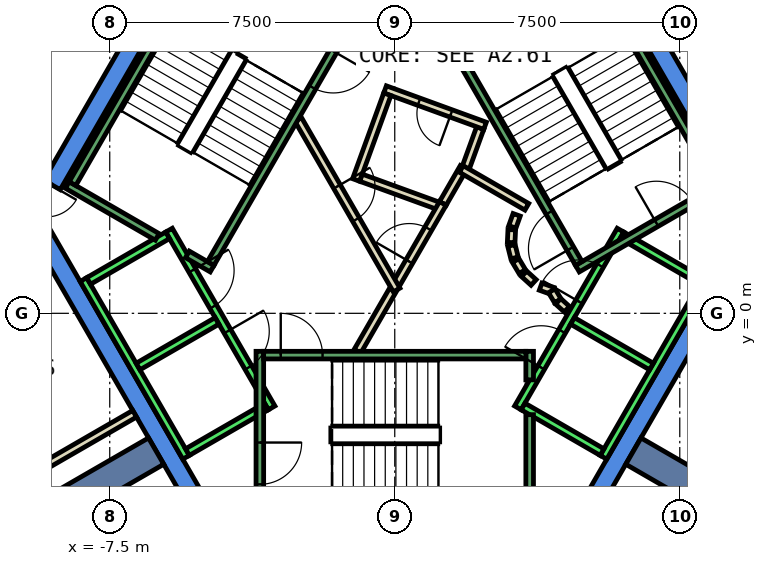
"""IFC4 building model, lengths in metres.
Left out: names, types, materials, properties, quantities, classifications, styles, units other than length and angle.
Written with IfcOpenShell. Run it as: python <this file> out.ifc"""

import sys

from ifc_helpers import new_model, si_unit, direction, frame, frame_2d, origin, place, context, subcontext, project, spatial, polyline, rectangle, outline, extrude, element, fill, save


model = new_model("IFC4")
c1 = context("Model", 3, precision=1e-05, world=origin(), true_north=direction((0.0, 1.0)))
c2 = subcontext(c1, "Body", "Model", "MODEL_VIEW")
j1 = project(units=[si_unit("LENGTHUNIT", "METRE"), si_unit("PLANEANGLEUNIT", "RADIAN")], contexts=[c1])
p1 = place(None, origin())
s1 = spatial("IfcSite", under=j1, at=p1, CompositionType="ELEMENT")
p2 = place(p1, origin())
s2 = spatial("IfcBuilding", under=s1, at=p2, CompositionType="ELEMENT")
p3 = place(p2, frame((0.0, 0.0, 286.4)))
s3 = spatial("IfcBuildingStorey", under=s2, at=p3, CompositionType="ELEMENT", Elevation=286.4)
p4 = place(p3, frame((0.0, 0.0, -0.6)))
e1 = element("IfcWall", 1, at=p4, inside=s3, PredefinedType="SHEAR", context=c2, shape_type="SweptSolid", body=[
    extrude(outline(polyline([(5.486, 9.998), (5.053, 9.748), (9.238, 2.5), (9.815, 2.5), (5.486, 9.998)])), origin(), (0.0, 0.0, 1.0), 3.86),
])
p5 = place(p3, frame((0.0, 0.0, -0.6)))
e2 = element("IfcWall", 2, at=p5, inside=s3, PredefinedType="SHEAR", context=c2, shape_type="SweptSolid", body=[
    extrude(outline(polyline([(-9.236, 3.502), (-8.803, 3.253), (-4.619, 10.5), (-4.907, 11.0), (-9.236, 3.502)])), origin(), (0.0, 0.0, 1.0), 3.86),
])
p6 = place(p3, frame((0.0, 0.0, -0.6)))
e3 = element("IfcWall", 3, at=p6, inside=s3, PredefinedType="SHEAR", context=c2, shape_type="SweptSolid", body=[
    extrude(outline(polyline([(-9.815, 2.5), (-4.907, -6.0), (-4.619, -5.5), (-9.238, 2.5), (-9.815, 2.5)])), origin(), (0.0, 0.0, 1.0), 3.86),
])
p7 = place(p3, frame((0.0, 0.0, -0.6)))
e4 = element("IfcWall", 4, at=p7, inside=s3, PredefinedType="SHEAR", context=c2, shape_type="SweptSolid", body=[
    extrude(outline(polyline([(4.907, -6.0), (9.815, 2.5), (9.238, 2.5), (4.619, -5.5), (4.907, -6.0)])), origin(), (0.0, 0.0, 1.0), 3.86),
])
for number, where, z_axis, x_axis in (
    (5, (6.279, -3.625, -0.6), (0.0, 0.0, 1.0), (0.866, -0.5, 0.0)),
    (6, (-6.279, -3.625, -0.6), (0.0, 0.0, 1.0), (-0.866, -0.5, 0.0)),
):
    element("IfcWall", number, at=place(p3, frame(where, z_axis=z_axis, x_axis=x_axis)), inside=s3, PredefinedType="SHEAR", context=c2, shape_type="SweptSolid", body=[
        extrude(rectangle(XDim=9.0, YDim=0.8, at=frame_2d((4.5, 0.0))), origin(), (0.0, 0.0, 1.0), 3.86),
    ])
p8 = place(p3, frame((1.264, 2.89, 0.0), z_axis=(0.0, 0.0, 1.0), x_axis=(0.500043792738, 0.866000118559, 0.0)))
e7 = element("IfcWall", 7, at=p8, inside=s3, PredefinedType="PARTITIONING", context=c2, shape_type="SweptSolid", body=[
    extrude(rectangle(XDim=1.096, YDim=0.2, at=frame_2d((0.548, 0.0))), origin(), (0.0, 0.0, 1.0), 3.26),
])
p9 = place(p3, frame((1.838, 3.748, 0.0), z_axis=(0.0, 0.0, 1.0), x_axis=(0.342266462435, 0.939602931398, 0.0)))
e8 = element("IfcWall", 8, at=p9, inside=s3, PredefinedType="PARTITIONING", context=c2, shape_type="SweptSolid", body=[
    extrude(rectangle(XDim=1.198, YDim=0.2, at=frame_2d((0.599, 0.0))), origin(), (0.0, 0.0, 1.0), 3.26),
])
p10 = place(p3, frame((2.376, 4.934, 0.0), z_axis=(0.0, 0.0, 1.0), x_axis=(-0.939640574808, 0.342163104635, 0.0)))
e9 = element("IfcWall", 9, at=p10, inside=s3, PredefinedType="PARTITIONING", context=c2, shape_type="SweptSolid", body=[
    extrude(rectangle(XDim=2.8, YDim=0.2, at=frame_2d((1.4, 0.0))), origin(), (0.0, 0.0, 1.0), 3.26),
])
p11 = place(p10, frame((0.95, 0.0, 0.0)))
e10 = element("IfcOpeningElement", 10, at=p11, cuts=e9, PredefinedType="OPENING", context=c2, shape_type="SweptSolid", body=[
    extrude(rectangle(XDim=0.9, YDim=2.1, at=frame_2d((0.45, 1.05))), frame((0.0, 0.11, 0.0), z_axis=(0.0, -1.0, 0.0), x_axis=(1.0, 0.0, 0.0)), (0.0, 0.0, 1.0), 0.22),
])
p12 = place(p3, frame((-0.196, 5.764, 0.0), z_axis=(0.0, 0.0, 1.0), x_axis=(-0.34165322761, -0.939826086073, 0.0)))
e11 = element("IfcWall", 11, at=p12, inside=s3, PredefinedType="PARTITIONING", context=c2, shape_type="SweptSolid", body=[
    extrude(rectangle(XDim=2.4, YDim=0.2, at=frame_2d((1.2, 0.0))), origin(), (0.0, 0.0, 1.0), 3.26),
])
p13 = place(p3, frame((-0.888, 3.568, 0.0), z_axis=(0.0, 0.0, 1.0), x_axis=(0.939685034098, -0.34204098686, 0.0)))
e12 = element("IfcWall", 12, at=p13, inside=s3, PredefinedType="PARTITIONING", context=c2, shape_type="SweptSolid", body=[
    extrude(rectangle(XDim=2.237, YDim=0.2, at=frame_2d((1.119, 0.0))), origin(), (0.0, 0.0, 1.0), 3.26),
])
p14 = place(p3, frame((-0.982, -1.0, 0.0), z_axis=(0.0, 0.0, 1.0), x_axis=(0.50024047865, 0.865886518847, 0.0)))
e13 = element("IfcWall", 13, at=p14, inside=s3, PredefinedType="PARTITIONING", context=c2, shape_type="SweptSolid", body=[
    extrude(rectangle(XDim=1.863, YDim=0.2, at=frame_2d((0.931, 0.0))), origin(), (0.0, 0.0, 1.0), 3.26),
])
p15 = place(p3, frame((0.05, 0.787, 0.0), z_axis=(0.0, 0.0, 1.0), x_axis=(0.499945861543, 0.866056658381, 0.0)))
e14 = element("IfcWall", 14, at=p15, inside=s3, PredefinedType="PARTITIONING", context=c2, shape_type="SweptSolid", body=[
    extrude(rectangle(XDim=2.428, YDim=0.2, at=frame_2d((1.214, 0.0))), origin(), (0.0, 0.0, 1.0), 3.26),
])
p16 = place(p15, frame((0.664, 0.0, 0.0)))
e15 = element("IfcOpeningElement", 15, at=p16, cuts=e14, PredefinedType="OPENING", context=c2, shape_type="SweptSolid", body=[
    extrude(rectangle(XDim=1.0, YDim=2.1, at=frame_2d((0.5, 1.05))), frame((0.0, 0.11, 0.0), z_axis=(0.0, -1.0, 0.0), x_axis=(1.0, 0.0, 0.0)), (0.0, 0.0, 1.0), 0.22),
])
p17 = place(p3, frame((1.751, 3.798, 0.0), z_axis=(0.0, 0.0, 1.0), x_axis=(0.866091650241, -0.499885240213, 0.0)))
e16 = element("IfcWall", 16, at=p17, inside=s3, PredefinedType="PARTITIONING", context=c2, shape_type="SweptSolid", body=[
    extrude(rectangle(XDim=1.991, YDim=0.2, at=frame_2d((0.995, 0.0))), origin(), (0.0, 0.0, 1.0), 3.26),
])
p18 = place(p3, frame((3.208, 2.592, 0.0), z_axis=(0.0, 0.0, 1.0), x_axis=(-0.337388820924, -0.941365382578, 0.0)))
e17 = element("IfcWall", 17, at=p18, inside=s3, PredefinedType="PARTITIONING", context=c2, shape_type="SweptSolid", body=[
    extrude(rectangle(XDim=0.338, YDim=0.2, at=frame_2d((0.169, 0.0))), origin(), (0.0, 0.0, 1.0), 3.26),
])
p19 = place(p3, frame((3.079, 2.199, 0.0), z_axis=(0.0, 0.0, 1.0), x_axis=(-0.047771483479, -0.998858290933, 0.0)))
e18 = element("IfcWall", 18, at=p19, inside=s3, PredefinedType="PARTITIONING", context=c2, shape_type="SweptSolid", body=[
    extrude(rectangle(XDim=0.337, YDim=0.2, at=frame_2d((0.169, 0.0))), origin(), (0.0, 0.0, 1.0), 3.26),
])
p20 = place(p3, frame((3.07, 1.786, 0.0), z_axis=(0.0, 0.0, 1.0), x_axis=(0.242705583207, -0.970099994784, 0.0)))
e19 = element("IfcWall", 19, at=p20, inside=s3, PredefinedType="PARTITIONING", context=c2, shape_type="SweptSolid", body=[
    extrude(rectangle(XDim=0.338, YDim=0.2, at=frame_2d((0.169, 0.0))), origin(), (0.0, 0.0, 1.0), 3.26),
])
for number, where, z_axis, x_axis in (
    (20, (3.182, 1.388, 0.0), (0.0, 0.0, 1.0), (0.512, -0.859, 0.0)),
    (21, (3.404, 1.039, 0.0), (0.0, 0.0, 1.0), (0.74, -0.672, 0.0)),
):
    element("IfcWall", number, at=place(p3, frame(where, z_axis=z_axis, x_axis=x_axis)), inside=s3, PredefinedType="PARTITIONING", context=c2, shape_type="SweptSolid", body=[
        extrude(rectangle(XDim=0.338, YDim=0.2, at=frame_2d((0.169, 0.0))), origin(), (0.0, 0.0, 1.0), 3.26),
    ])
p21 = place(p3, frame((3.838, 0.702, 0.0), z_axis=(0.0, 0.0, 1.0), x_axis=(0.941035081519, -0.338308993895, 0.0)))
e22 = element("IfcWall", 22, at=p21, inside=s3, PredefinedType="PARTITIONING", context=c2, shape_type="SweptSolid", body=[
    extrude(rectangle(XDim=0.337, YDim=0.2, at=frame_2d((0.168, 0.0))), origin(), (0.0, 0.0, 1.0), 3.26),
])
p22 = place(p3, frame((4.132, 0.593, 0.0), z_axis=(0.0, 0.0, 1.0), x_axis=(0.513561617048, -0.858052717201, 0.0)))
e23 = element("IfcWall", 23, at=p22, inside=s3, PredefinedType="PARTITIONING", context=c2, shape_type="SweptSolid", body=[
    extrude(rectangle(XDim=0.308, YDim=0.2, at=frame_2d((0.154, 0.0))), origin(), (0.0, 0.0, 1.0), 3.26),
])
p23 = place(p3, frame((4.301, 0.315, 0.0), z_axis=(0.0, 0.0, 1.0), x_axis=(0.741798017506, -0.670623367639, 0.0)))
e24 = element("IfcWall", 24, at=p23, inside=s3, PredefinedType="PARTITIONING", context=c2, shape_type="SweptSolid", body=[
    extrude(rectangle(XDim=0.309, YDim=0.2, at=frame_2d((0.154, 0.0))), origin(), (0.0, 0.0, 1.0), 3.26),
])
p24 = place(p3, frame((-2.54, 5.1, 0.0), z_axis=(0.0, 0.0, 1.0), x_axis=(0.499925051871, -0.866068670783, 0.0)))
e25 = element("IfcWall", 25, at=p24, inside=s3, PredefinedType="PARTITIONING", context=c2, shape_type="SweptSolid", body=[
    extrude(rectangle(XDim=5.181, YDim=0.2, at=frame_2d((2.59, 0.0))), origin(), (0.0, 0.0, 1.0), 3.26),
])
p25 = place(p24, frame((2.04, 0.0, 0.0)))
e26 = element("IfcOpeningElement", 26, at=p25, cuts=e25, PredefinedType="OPENING", context=c2, shape_type="SweptSolid", body=[
    extrude(rectangle(XDim=1.0, YDim=2.1, at=frame_2d((0.5, 1.05))), frame((0.0, 0.11, 0.0), z_axis=(0.0, -1.0, 0.0), x_axis=(1.0, 0.0, 0.0)), (0.0, 0.0, 1.0), 0.22),
])
p26 = place(p3, frame((-6.845, -2.643, 0.0), z_axis=(0.0, 0.0, 1.0), x_axis=(-0.865994457699, -0.500053596362, 0.0)))
e27 = element("IfcWall", 27, at=p26, inside=s3, PredefinedType="PARTITIONING", context=c2, shape_type="SweptSolid", body=[
    extrude(rectangle(XDim=6.701, YDim=0.2, at=frame_2d((3.351, 0.0))), origin(), (0.0, 0.0, 1.0), 3.26),
])
p27 = place(p3, frame((-5.94, 2.188, 0.0), z_axis=(0.0, 0.0, 1.0), x_axis=(0.500034260056, -0.866005622828, 0.0)))
e28 = element("IfcWall", 28, at=p27, inside=s3, PredefinedType="STANDARD", context=c2, shape_type="SweptSolid", body=[
    extrude(rectangle(XDim=5.399, YDim=0.2, at=frame_2d((2.7, 0.0))), origin(), (0.0, 0.0, 1.0), 3.26),
])
p28 = place(p27, frame((3.075, 0.0, 0.0)))
e29 = element("IfcOpeningElement", 29, at=p28, cuts=e28, PredefinedType="OPENING", context=c2, shape_type="SweptSolid", body=[
    extrude(rectangle(XDim=1.1, YDim=2.1, at=frame_2d((0.55, 1.05))), frame((0.0, 0.11, 0.0), z_axis=(0.0, -1.0, 0.0), x_axis=(1.0, 0.0, 0.0)), (0.0, 0.0, 1.0), 0.22),
])
p29 = place(p27, frame((1.225, 0.0, 0.0)))
e30 = element("IfcOpeningElement", 30, at=p29, cuts=e28, PredefinedType="OPENING", context=c2, shape_type="SweptSolid", body=[
    extrude(rectangle(XDim=1.1, YDim=2.1, at=frame_2d((0.55, 1.05))), frame((0.0, 0.11, 0.0), z_axis=(0.0, -1.0, 0.0), x_axis=(1.0, 0.0, 0.0)), (0.0, 0.0, 1.0), 0.22),
])
p30 = place(p3, frame((-8.192, 0.888, 0.0), z_axis=(0.0, 0.0, 1.0), x_axis=(0.500034260056, -0.866005622828, 0.0)))
e31 = element("IfcWall", 31, at=p30, inside=s3, PredefinedType="STANDARD", context=c2, shape_type="SweptSolid", body=[
    extrude(rectangle(XDim=5.399, YDim=0.2, at=frame_2d((2.7, 0.0))), origin(), (0.0, 0.0, 1.0), 3.26),
])
for number, where, z_axis, x_axis in (
    (32, (-5.977, 2.052, 0.0), (0.0, 0.0, 1.0), (-0.866, -0.5, 0.0)),
    (33, (-4.677, -0.2, 0.0), (0.0, 0.0, 1.0), (-0.866, -0.5, 0.0)),
):
    element("IfcWall", number, at=place(p3, frame(where, z_axis=z_axis, x_axis=x_axis)), inside=s3, PredefinedType="STANDARD", context=c2, shape_type="SweptSolid", body=[
        extrude(rectangle(XDim=2.399, YDim=0.2, at=frame_2d((1.2, 0.0))), origin(), (0.0, 0.0, 1.0), 3.26),
    ])
p31 = place(p3, frame((-3.377, -2.452, 0.0), z_axis=(0.0, 0.0, 1.0), x_axis=(-0.865955154139, -0.50012165622, 0.0)))
e34 = element("IfcWall", 34, at=p31, inside=s3, PredefinedType="STANDARD", context=c2, shape_type="SweptSolid", body=[
    extrude(rectangle(XDim=2.4, YDim=0.2, at=frame_2d((1.2, 0.0))), origin(), (0.0, 0.0, 1.0), 3.26),
])
p32 = place(p3, frame((3.24, -2.488, 0.0), z_axis=(0.0, 0.0, 1.0), x_axis=(0.500034260056, 0.866005622828, 0.0)))
e35 = element("IfcWall", 35, at=p32, inside=s3, PredefinedType="STANDARD", context=c2, shape_type="SweptSolid", body=[
    extrude(rectangle(XDim=5.399, YDim=0.2, at=frame_2d((2.7, 0.0))), origin(), (0.0, 0.0, 1.0), 3.26),
])
p33 = place(p32, frame((3.225, 0.0, 0.0)))
e36 = element("IfcOpeningElement", 36, at=p33, cuts=e35, PredefinedType="OPENING", context=c2, shape_type="SweptSolid", body=[
    extrude(rectangle(XDim=1.1, YDim=2.1, at=frame_2d((0.55, 1.05))), frame((0.0, 0.11, 0.0), z_axis=(0.0, -1.0, 0.0), x_axis=(1.0, 0.0, 0.0)), (0.0, 0.0, 1.0), 0.22),
])
p34 = place(p32, frame((1.225, 0.0, 0.0)))
e37 = element("IfcOpeningElement", 37, at=p34, cuts=e35, PredefinedType="OPENING", context=c2, shape_type="SweptSolid", body=[
    extrude(rectangle(XDim=1.1, YDim=2.1, at=frame_2d((0.55, 1.05))), frame((0.0, 0.11, 0.0), z_axis=(0.0, -1.0, 0.0), x_axis=(1.0, 0.0, 0.0)), (0.0, 0.0, 1.0), 0.22),
])
p35 = place(p3, frame((5.492, -3.788, 0.0), z_axis=(0.0, 0.0, 1.0), x_axis=(0.500034260056, 0.866005622828, 0.0)))
e38 = element("IfcWall", 38, at=p35, inside=s3, PredefinedType="STANDARD", context=c2, shape_type="SweptSolid", body=[
    extrude(rectangle(XDim=5.399, YDim=0.2, at=frame_2d((2.7, 0.0))), origin(), (0.0, 0.0, 1.0), 3.26),
])
p36 = place(p3, frame((3.377, -2.452, 0.0), z_axis=(0.0, 0.0, 1.0), x_axis=(0.865955154139, -0.50012165622, 0.0)))
e39 = element("IfcWall", 39, at=p36, inside=s3, PredefinedType="STANDARD", context=c2, shape_type="SweptSolid", body=[
    extrude(rectangle(XDim=2.4, YDim=0.2, at=frame_2d((1.2, 0.0))), origin(), (0.0, 0.0, 1.0), 3.26),
])
for number, where, z_axis, x_axis in (
    (40, (4.677, -0.2, 0.0), (0.0, 0.0, 1.0), (0.866, -0.5, 0.0)),
    (41, (5.977, 2.052, 0.0), (0.0, 0.0, 1.0), (0.866, -0.5, 0.0)),
):
    element("IfcWall", number, at=place(p3, frame(where, z_axis=z_axis, x_axis=x_axis)), inside=s3, PredefinedType="STANDARD", context=c2, shape_type="SweptSolid", body=[
        extrude(rectangle(XDim=2.399, YDim=0.2, at=frame_2d((1.2, 0.0))), origin(), (0.0, 0.0, 1.0), 3.26),
    ])
p37 = place(p3, frame((-3.55, -1.0, 0.0), z_axis=(0.0, 0.0, 1.0), x_axis=(0.0, -1.0, 0.0)))
e42 = element("IfcWall", 42, at=p37, inside=s3, PredefinedType="STANDARD", context=c2, shape_type="SweptSolid", body=[
    extrude(rectangle(XDim=4.4, YDim=0.2, at=frame_2d((2.2, 0.0))), origin(), (0.0, 0.0, 1.0), 3.26),
])
p38 = place(p37, frame((2.4, 0.0, 0.0)))
e43 = element("IfcOpeningElement", 43, at=p38, cuts=e42, PredefinedType="OPENING", context=c2, shape_type="SweptSolid", body=[
    extrude(rectangle(XDim=1.1, YDim=2.2, at=frame_2d((0.55, 1.1))), frame((0.0, 0.11, 0.0), z_axis=(0.0, -1.0, 0.0), x_axis=(1.0, 0.0, 0.0)), (0.0, 0.0, 1.0), 0.22),
])
p39 = place(p3, frame((3.55, -2.667, 0.0), z_axis=(0.0, 0.0, 1.0), x_axis=(0.0, -1.0, 0.0)))
e44 = element("IfcWall", 44, at=p39, inside=s3, PredefinedType="STANDARD", context=c2, shape_type="SweptSolid", body=[
    extrude(rectangle(XDim=2.733, YDim=0.2, at=frame_2d((1.366, 0.0))), origin(), (0.0, 0.0, 1.0), 3.26),
])
p40 = place(p3, frame((3.55, -1.0, 0.0), z_axis=(0.0, 0.0, 1.0), x_axis=(0.0, -1.0, 0.0)))
e45 = element("IfcWall", 45, at=p40, inside=s3, PredefinedType="STANDARD", context=c2, shape_type="SweptSolid", body=[
    extrude(rectangle(XDim=0.751, YDim=0.2, at=frame_2d((0.375, 0.0))), origin(), (0.0, 0.0, 1.0), 3.26),
])
p41 = place(p3, frame((-3.45, -1.1, 0.0), z_axis=(0.0, 0.0, 1.0), x_axis=(1.0, 0.0, 0.0)))
e46 = element("IfcWall", 46, at=p41, inside=s3, PredefinedType="STANDARD", context=c2, shape_type="SweptSolid", body=[
    extrude(rectangle(XDim=6.9, YDim=0.2, at=frame_2d((3.45, 0.0))), origin(), (0.0, 0.0, 1.0), 3.26),
])
p42 = place(p41, frame((0.45, 0.0, 0.0)))
e47 = element("IfcOpeningElement", 47, at=p42, cuts=e46, PredefinedType="OPENING", context=c2, shape_type="SweptSolid", body=[
    extrude(rectangle(XDim=1.1, YDim=2.2, at=frame_2d((0.55, 1.1))), frame((0.0, 0.11, 0.0), z_axis=(0.0, -1.0, 0.0), x_axis=(1.0, 0.0, 0.0)), (0.0, 0.0, 1.0), 0.22),
])
p43 = place(p3, frame((4.806, 1.176, 0.0), z_axis=(0.0, 0.0, 1.0), x_axis=(0.866059941101, 0.499940174841, 0.0)))
e48 = element("IfcWall", 48, at=p43, inside=s3, PredefinedType="STANDARD", context=c2, shape_type="SweptSolid", body=[
    extrude(rectangle(XDim=4.4, YDim=0.2, at=frame_2d((2.2, 0.0))), origin(), (0.0, 0.0, 1.0), 3.26),
])
p44 = place(p43, frame((2.4, 0.0, 0.0)))
e49 = element("IfcOpeningElement", 49, at=p44, cuts=e48, PredefinedType="OPENING", context=c2, shape_type="SweptSolid", body=[
    extrude(rectangle(XDim=1.1, YDim=2.2, at=frame_2d((0.55, 1.1))), frame((0.0, 0.11, 0.0), z_axis=(0.0, -1.0, 0.0), x_axis=(1.0, 0.0, 0.0)), (0.0, 0.0, 1.0), 0.22),
])
p45 = place(p3, frame((4.843, 1.312, 0.0), z_axis=(0.0, 0.0, 1.0), x_axis=(-0.499963383562, 0.866046543262, 0.0)))
e50 = element("IfcWall", 50, at=p45, inside=s3, PredefinedType="STANDARD", context=c2, shape_type="SweptSolid", body=[
    extrude(rectangle(XDim=6.9, YDim=0.2, at=frame_2d((3.45, 0.0))), origin(), (0.0, 0.0, 1.0), 3.26),
])
p46 = place(p45, frame((0.45, 0.0, 0.0)))
e51 = element("IfcOpeningElement", 51, at=p46, cuts=e50, PredefinedType="OPENING", context=c2, shape_type="SweptSolid", body=[
    extrude(rectangle(XDim=1.1, YDim=2.2, at=frame_2d((0.55, 1.1))), frame((0.0, 0.11, 0.0), z_axis=(0.0, -1.0, 0.0), x_axis=(1.0, 0.0, 0.0)), (0.0, 0.0, 1.0), 0.22),
])
p47 = place(p3, frame((8.48, 3.412, 0.0), z_axis=(0.0, 0.0, 1.0), x_axis=(-0.499978703459, 0.866037698999, 0.0)))
e52 = element("IfcWall", 52, at=p47, inside=s3, PredefinedType="STANDARD", context=c2, shape_type="SweptSolid", body=[
    extrude(rectangle(XDim=6.9, YDim=0.2, at=frame_2d((3.45, 0.0))), origin(), (0.0, 0.0, 1.0), 3.26),
])
p48 = place(p3, frame((-6.25, 2.01, 0.0), z_axis=(0.0, 0.0, 1.0), x_axis=(-0.86611865017, 0.499838457731, 0.0)))
e53 = element("IfcWall", 53, at=p48, inside=s3, PredefinedType="STANDARD", context=c2, shape_type="SweptSolid", body=[
    extrude(rectangle(XDim=2.733, YDim=0.2, at=frame_2d((1.366, 0.0))), origin(), (0.0, 0.0, 1.0), 3.26),
])
p49 = place(p3, frame((-4.806, 1.176, 0.0), z_axis=(0.0, 0.0, 1.0), x_axis=(-0.866558586415, 0.499075361355, 0.0)))
e54 = element("IfcWall", 54, at=p49, inside=s3, PredefinedType="STANDARD", context=c2, shape_type="SweptSolid", body=[
    extrude(rectangle(XDim=0.751, YDim=0.2, at=frame_2d((0.376, 0.0))), origin(), (0.0, 0.0, 1.0), 3.26),
])
p50 = place(p3, frame((-1.393, 7.288, 0.0), z_axis=(0.0, 0.0, 1.0), x_axis=(-0.499963383562, -0.866046543262, 0.0)))
e55 = element("IfcWall", 55, at=p50, inside=s3, PredefinedType="STANDARD", context=c2, shape_type="SweptSolid", body=[
    extrude(rectangle(XDim=6.9, YDim=0.2, at=frame_2d((3.45, 0.0))), origin(), (0.0, 0.0, 1.0), 3.26),
])
p51 = place(p50, frame((0.45, 0.0, 0.0)))
e56 = element("IfcOpeningElement", 56, at=p51, cuts=e55, PredefinedType="OPENING", context=c2, shape_type="SweptSolid", body=[
    extrude(rectangle(XDim=1.1, YDim=2.2, at=frame_2d((0.55, 1.1))), frame((0.0, 0.11, 0.0), z_axis=(0.0, -1.0, 0.0), x_axis=(1.0, 0.0, 0.0)), (0.0, 0.0, 1.0), 0.22),
])
p52 = place(p3, frame((-5.03, 9.388, 0.0), z_axis=(0.0, 0.0, 1.0), x_axis=(-0.499978703459, -0.866037698999, 0.0)))
e57 = element("IfcWall", 57, at=p52, inside=s3, PredefinedType="STANDARD", context=c2, shape_type="SweptSolid", body=[
    extrude(rectangle(XDim=6.9, YDim=0.2, at=frame_2d((3.45, 0.0))), origin(), (0.0, 0.0, 1.0), 3.26),
])
p53 = place(p16, origin())
e58 = element("IfcDoor", 58, at=p53, inside=s3, OperationType="SINGLE_SWING_RIGHT", PredefinedType="DOOR", context=c2, shape_type="SweptSolid", body=[
    extrude(rectangle(XDim=1.0, YDim=2.1, at=frame_2d((0.5, 1.05))), frame((0.0, 0.025, 0.0), z_axis=(0.0, -1.0, 0.0), x_axis=(1.0, 0.0, 0.0)), (0.0, 0.0, 1.0), 0.05),
])
fill(e15, e58)
p54 = place(p25, origin())
e59 = element("IfcDoor", 59, at=p54, inside=s3, OperationType="SINGLE_SWING_RIGHT", PredefinedType="DOOR", context=c2, shape_type="SweptSolid", body=[
    extrude(rectangle(XDim=1.0, YDim=2.1, at=frame_2d((0.5, 1.05))), frame((0.0, 0.025, 0.0), z_axis=(0.0, -1.0, 0.0), x_axis=(1.0, 0.0, 0.0)), (0.0, 0.0, 1.0), 0.05),
])
fill(e26, e59)
p55 = place(p11, origin())
e60 = element("IfcDoor", 60, at=p55, inside=s3, OperationType="SINGLE_SWING_LEFT", PredefinedType="DOOR", context=c2, shape_type="SweptSolid", body=[
    extrude(rectangle(XDim=0.9, YDim=2.1, at=frame_2d((0.45, 1.05))), frame((0.0, 0.025, 0.0), z_axis=(0.0, -1.0, 0.0), x_axis=(1.0, 0.0, 0.0)), (0.0, 0.0, 1.0), 0.05),
])
fill(e10, e60)
p56 = place(p33, origin())
e61 = element("IfcDoor", 61, at=p56, inside=s3, OperationType="SLIDING_TO_LEFT", PredefinedType="DOOR", context=c2, shape_type="SweptSolid", body=[
    extrude(rectangle(XDim=1.1, YDim=2.1, at=frame_2d((0.55, 1.05))), frame((0.0, 0.025, 0.0), z_axis=(0.0, -1.0, 0.0), x_axis=(1.0, 0.0, 0.0)), (0.0, 0.0, 1.0), 0.05),
])
fill(e36, e61)
p57 = place(p28, origin())
e62 = element("IfcDoor", 62, at=p57, inside=s3, OperationType="SLIDING_TO_LEFT", PredefinedType="DOOR", context=c2, shape_type="SweptSolid", body=[
    extrude(rectangle(XDim=1.1, YDim=2.1, at=frame_2d((0.55, 1.05))), frame((0.0, 0.025, 0.0), z_axis=(0.0, -1.0, 0.0), x_axis=(1.0, 0.0, 0.0)), (0.0, 0.0, 1.0), 0.05),
])
fill(e29, e62)
p58 = place(p34, origin())
e63 = element("IfcDoor", 63, at=p58, inside=s3, OperationType="SLIDING_TO_LEFT", PredefinedType="DOOR", context=c2, shape_type="SweptSolid", body=[
    extrude(rectangle(XDim=1.1, YDim=2.1, at=frame_2d((0.55, 1.05))), frame((0.0, 0.025, 0.0), z_axis=(0.0, -1.0, 0.0), x_axis=(1.0, 0.0, 0.0)), (0.0, 0.0, 1.0), 0.05),
])
fill(e37, e63)
p59 = place(p29, origin())
e64 = element("IfcDoor", 64, at=p59, inside=s3, OperationType="SLIDING_TO_LEFT", PredefinedType="DOOR", context=c2, shape_type="SweptSolid", body=[
    extrude(rectangle(XDim=1.1, YDim=2.1, at=frame_2d((0.55, 1.05))), frame((0.0, 0.025, 0.0), z_axis=(0.0, -1.0, 0.0), x_axis=(1.0, 0.0, 0.0)), (0.0, 0.0, 1.0), 0.05),
])
fill(e30, e64)
p60 = place(p42, origin())
e65 = element("IfcDoor", 65, at=p60, inside=s3, OperationType="SINGLE_SWING_LEFT", PredefinedType="DOOR", context=c2, shape_type="SweptSolid", body=[
    extrude(rectangle(XDim=1.1, YDim=2.2, at=frame_2d((0.55, 1.1))), frame((0.0, 0.025, 0.0), z_axis=(0.0, -1.0, 0.0), x_axis=(1.0, 0.0, 0.0)), (0.0, 0.0, 1.0), 0.05),
])
fill(e47, e65)
p61 = place(p38, origin())
e66 = element("IfcDoor", 66, at=p61, inside=s3, OperationType="SINGLE_SWING_LEFT", PredefinedType="DOOR", context=c2, shape_type="SweptSolid", body=[
    extrude(rectangle(XDim=1.1, YDim=2.2, at=frame_2d((0.55, 1.1))), frame((0.0, 0.025, 0.0), z_axis=(0.0, -1.0, 0.0), x_axis=(1.0, 0.0, 0.0)), (0.0, 0.0, 1.0), 0.05),
])
fill(e43, e66)
p62 = place(p46, origin())
e67 = element("IfcDoor", 67, at=p62, inside=s3, OperationType="SINGLE_SWING_LEFT", PredefinedType="DOOR", context=c2, shape_type="SweptSolid", body=[
    extrude(rectangle(XDim=1.1, YDim=2.2, at=frame_2d((0.55, 1.1))), frame((0.0, 0.025, 0.0), z_axis=(0.0, -1.0, 0.0), x_axis=(1.0, 0.0, 0.0)), (0.0, 0.0, 1.0), 0.05),
])
fill(e51, e67)
p63 = place(p44, origin())
e68 = element("IfcDoor", 68, at=p63, inside=s3, OperationType="SINGLE_SWING_LEFT", PredefinedType="DOOR", context=c2, shape_type="SweptSolid", body=[
    extrude(rectangle(XDim=1.1, YDim=2.2, at=frame_2d((0.55, 1.1))), frame((0.0, 0.025, 0.0), z_axis=(0.0, -1.0, 0.0), x_axis=(1.0, 0.0, 0.0)), (0.0, 0.0, 1.0), 0.05),
])
fill(e49, e68)
p64 = place(p51, origin())
e69 = element("IfcDoor", 69, at=p64, inside=s3, OperationType="SINGLE_SWING_LEFT", PredefinedType="DOOR", context=c2, shape_type="SweptSolid", body=[
    extrude(rectangle(XDim=1.1, YDim=2.2, at=frame_2d((0.55, 1.1))), frame((0.0, 0.025, 0.0), z_axis=(0.0, -1.0, 0.0), x_axis=(1.0, 0.0, 0.0)), (0.0, 0.0, 1.0), 0.05),
])
fill(e56, e69)
save(model, sys.argv[1])
